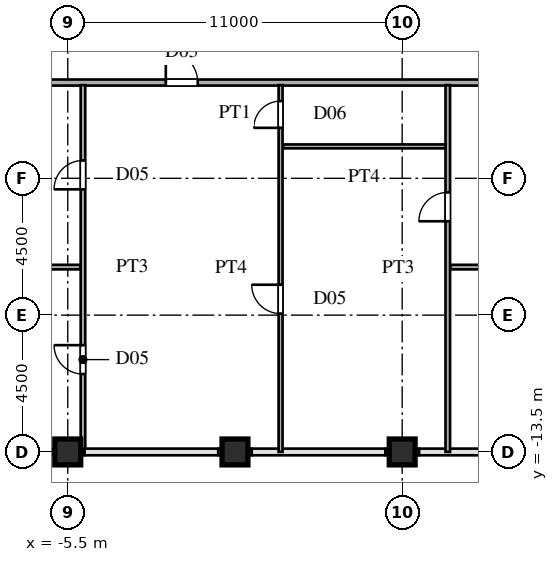
"""IFC4 building model, lengths in metres.
Left out: names, types, materials, properties, quantities, classifications, styles, units other than length and angle.
Written with IfcOpenShell. Run it as: python <this file> out.ifc"""

import sys

from ifc_helpers import new_model, si_unit, direction, frame, frame_2d, origin, origin_2d, place, context, subcontext, project, spatial, rectangle, hollow_rectangle, extrude, source, transform, mapped, element, fill, save


model = new_model("IFC4")
c1 = context("Model", 3, precision=1e-05, world=origin(), true_north=direction((0.0, 1.0)))
c2 = subcontext(c1, "Body", "Model", "MODEL_VIEW")
j1 = project(units=[si_unit("LENGTHUNIT", "METRE"), si_unit("PLANEANGLEUNIT", "RADIAN")], contexts=[c1])
p1 = place(None, origin())
s1 = spatial("IfcSite", under=j1, at=p1, CompositionType="ELEMENT")
p2 = place(p1, origin())
s2 = spatial("IfcBuilding", under=s1, at=p2, CompositionType="ELEMENT")
p3 = place(p2, frame((0.0, 0.0, 254.4)))
s3 = spatial("IfcBuildingStorey", under=s2, at=p3, CompositionType="ELEMENT", Elevation=254.4)
m1 = source(origin(), c2, "Body", "SweptSolid", [
    extrude(hollow_rectangle(XDim=0.85, YDim=0.85, WallThickness=0.036, at=origin_2d()), origin(), (0.0, 0.0, 1.0), 3.75),
])
for number, where, z_axis, x_axis in (
    (1, (-5.5, -13.5, 0.0), (0.0, 0.0, 1.0), (1.0, 0.0, 0.0)),
    (2, (0.0, -13.5, 0.0), (0.0, 0.0, 1.0), (1.0, 0.0, 0.0)),
    (3, (5.5, -13.5, 0.0), (0.0, 0.0, 1.0), (1.0, 0.0, 0.0)),
):
    element("IfcColumn", number, at=place(p3, frame(where, z_axis=z_axis, x_axis=x_axis)), inside=s3, PredefinedType="COLUMN", context=c2, shape_type="MappedRepresentation", body=[
        mapped(m1, transform((0.0, 0.0, 0.0), scale=1.0)),
    ])
for number, where, z_axis, x_axis in (
    (4, (-6.05, -13.5, 0.0), (0.0, 0.0, 1.0), (1.0, 0.0, 0.0)),
    (5, (-0.55, -13.5, 0.0), (0.0, 0.0, 1.0), (1.0, 0.0, 0.0)),
    (6, (4.95, -13.5, 0.0), (0.0, 0.0, 1.0), (1.0, 0.0, 0.0)),
):
    element("IfcWall", number, at=place(p3, frame(where, z_axis=z_axis, x_axis=x_axis)), inside=s3, PredefinedType="SOLIDWALL", context=c2, shape_type="SweptSolid", body=[
        extrude(rectangle(XDim=1.1, YDim=0.21, at=frame_2d((0.55, 0.0))), origin(), (0.0, 0.0, 1.0), 3.03),
    ])
p4 = place(p3, frame((-11.915, -7.42, 0.0), z_axis=(0.0, 0.0, 1.0), x_axis=(1.0, 0.0, 0.0)))
e7 = element("IfcWall", 7, at=p4, inside=s3, PredefinedType="PARTITIONING", context=c2, shape_type="SweptSolid", body=[
    extrude(rectangle(XDim=6.83, YDim=0.15, at=frame_2d((3.415, 0.0))), origin(), (0.0, 0.0, 1.0), 3.53),
])
p5 = place(p3, frame((7.085, -7.42, 0.0), z_axis=(0.0, 0.0, 1.0), x_axis=(1.0, 0.0, 0.0)))
e8 = element("IfcWall", 8, at=p5, inside=s3, PredefinedType="PARTITIONING", context=c2, shape_type="SweptSolid", body=[
    extrude(rectangle(XDim=20.16, YDim=0.15, at=frame_2d((10.08, 0.0))), origin(), (0.0, 0.0, 1.0), 3.53),
])
p6 = place(p5, frame((3.44, 0.0, 0.0)))
e9 = element("IfcOpeningElement", 9, at=p6, cuts=e8, PredefinedType="OPENING", context=c2, shape_type="SweptSolid", body=[
    extrude(rectangle(XDim=0.95, YDim=2.15, at=frame_2d((0.475, 1.075))), frame((0.0, 0.085, 0.0), z_axis=(0.0, -1.0, 0.0), x_axis=(1.0, 0.0, 0.0)), (0.0, 0.0, 1.0), 0.17),
])
p7 = place(p5, frame((10.69, 0.0, 0.0)))
e10 = element("IfcOpeningElement", 10, at=p7, cuts=e8, PredefinedType="OPENING", context=c2, shape_type="SweptSolid", body=[
    extrude(rectangle(XDim=0.95, YDim=2.15, at=frame_2d((0.475, 1.075))), frame((0.0, 0.085, 0.0), z_axis=(0.0, -1.0, 0.0), x_axis=(1.0, 0.0, 0.0)), (0.0, 0.0, 1.0), 0.17),
])
p8 = place(p5, frame((16.94, 0.0, 0.0)))
e11 = element("IfcOpeningElement", 11, at=p8, cuts=e8, PredefinedType="OPENING", context=c2, shape_type="SweptSolid", body=[
    extrude(rectangle(XDim=0.95, YDim=2.15, at=frame_2d((0.475, 1.075))), frame((0.0, 0.085, 0.0), z_axis=(0.0, -1.0, 0.0), x_axis=(1.0, 0.0, 0.0)), (0.0, 0.0, 1.0), 0.17),
])
p9 = place(p3, frame((1.585, -3.45, 0.0), z_axis=(0.0, 0.0, 1.0), x_axis=(1.0, 0.0, 0.0)))
e12 = element("IfcWall", 12, at=p9, inside=s3, PredefinedType="PARTITIONING", context=c2, shape_type="SweptSolid", body=[
    extrude(rectangle(XDim=5.33, YDim=0.13, at=frame_2d((2.665, 0.0))), origin(), (0.0, 0.0, 1.0), 3.53),
])
p10 = place(p3, frame((-27.245, -1.35, 0.0), z_axis=(0.0, 0.0, 1.0), x_axis=(1.0, 0.0, 0.0)))
e13 = element("IfcWall", 13, at=p10, inside=s3, PredefinedType="PARTITIONING", context=c2, shape_type="SweptSolid", body=[
    extrude(rectangle(XDim=54.49, YDim=0.2, at=frame_2d((27.245, 0.0))), origin(), (0.0, 0.0, 1.0), 3.53),
])
p11 = place(p10, frame((24.97, 0.0, 0.0)))
e14 = element("IfcOpeningElement", 14, at=p11, cuts=e13, PredefinedType="OPENING", context=c2, shape_type="SweptSolid", body=[
    extrude(rectangle(XDim=1.05, YDim=2.25, at=frame_2d((0.525, 1.125))), frame((0.0, 0.11, 0.0), z_axis=(0.0, -1.0, 0.0), x_axis=(1.0, 0.0, 0.0)), (0.0, 0.0, 1.0), 0.22),
])
p12 = place(p3, frame((-5.0, -13.39, 0.0), z_axis=(0.0, 0.0, 1.0), x_axis=(0.0, 1.0, 0.0)))
e15 = element("IfcWall", 15, at=p12, inside=s3, PredefinedType="PARTITIONING", context=c2, shape_type="SweptSolid", body=[
    extrude(rectangle(XDim=11.955, YDim=0.15, at=frame_2d((5.978, 0.0))), origin(), (0.0, 0.0, 1.0), 3.53),
])
p13 = place(p12, frame((8.528, 0.0, 0.0)))
e16 = element("IfcOpeningElement", 16, at=p13, cuts=e15, PredefinedType="OPENING", context=c2, shape_type="SweptSolid", body=[
    extrude(rectangle(XDim=0.95, YDim=2.15, at=frame_2d((0.475, 1.075))), frame((0.0, 0.085, 0.0), z_axis=(0.0, -1.0, 0.0), x_axis=(1.0, 0.0, 0.0)), (0.0, 0.0, 1.0), 0.17),
])
p14 = place(p12, frame((2.452, 0.0, 0.0)))
e17 = element("IfcOpeningElement", 17, at=p14, cuts=e15, PredefinedType="OPENING", context=c2, shape_type="SweptSolid", body=[
    extrude(rectangle(XDim=0.95, YDim=2.15, at=frame_2d((0.475, 1.075))), frame((0.0, 0.085, 0.0), z_axis=(0.0, -1.0, 0.0), x_axis=(1.0, 0.0, 0.0)), (0.0, 0.0, 1.0), 0.17),
])
p15 = place(p3, frame((1.5, -13.5, 0.0), z_axis=(0.0, 0.0, 1.0), x_axis=(0.0, 1.0, 0.0)))
e18 = element("IfcWall", 18, at=p15, inside=s3, PredefinedType="PARTITIONING", context=c2, shape_type="SweptSolid", body=[
    extrude(rectangle(XDim=12.065, YDim=0.13, at=frame_2d((6.032, 0.0))), origin(), (0.0, 0.0, 1.0), 3.53),
])
p16 = place(p15, frame((10.66, 0.0, 0.0)))
e19 = element("IfcOpeningElement", 19, at=p16, cuts=e18, PredefinedType="OPENING", context=c2, shape_type="SweptSolid", body=[
    extrude(rectangle(XDim=0.88, YDim=2.1, at=frame_2d((0.44, 1.05))), frame((0.0, 0.075, 0.0), z_axis=(0.0, -1.0, 0.0), x_axis=(1.0, 0.0, 0.0)), (0.0, 0.0, 1.0), 0.15),
])
p17 = place(p15, frame((4.55, 0.0, 0.0)))
e20 = element("IfcOpeningElement", 20, at=p17, cuts=e18, PredefinedType="OPENING", context=c2, shape_type="SweptSolid", body=[
    extrude(rectangle(XDim=0.95, YDim=2.15, at=frame_2d((0.475, 1.075))), frame((0.0, 0.075, 0.0), z_axis=(0.0, -1.0, 0.0), x_axis=(1.0, 0.0, 0.0)), (0.0, 0.0, 1.0), 0.15),
])
p18 = place(p3, frame((7.0, -13.5, 0.0), z_axis=(0.0, 0.0, 1.0), x_axis=(0.0, 1.0, 0.0)))
e21 = element("IfcWall", 21, at=p18, inside=s3, PredefinedType="PARTITIONING", context=c2, shape_type="SweptSolid", body=[
    extrude(rectangle(XDim=12.065, YDim=0.15, at=frame_2d((6.032, 0.0))), origin(), (0.0, 0.0, 1.0), 3.53),
])
p19 = place(p18, frame((7.587, 0.0, 0.0)))
e22 = element("IfcOpeningElement", 22, at=p19, cuts=e21, PredefinedType="OPENING", context=c2, shape_type="SweptSolid", body=[
    extrude(rectangle(XDim=0.95, YDim=2.15, at=frame_2d((0.475, 1.075))), frame((0.0, 0.085, 0.0), z_axis=(0.0, -1.0, 0.0), x_axis=(1.0, 0.0, 0.0)), (0.0, 0.0, 1.0), 0.17),
])
m2 = source(origin(), c2, "Body", "SweptSolid", [
    extrude(rectangle(XDim=1.05, YDim=2.25, at=frame_2d((0.525, 1.125))), frame((0.0, 0.025, 0.0), z_axis=(0.0, -1.0, 0.0), x_axis=(1.0, 0.0, 0.0)), (0.0, 0.0, 1.0), 0.05),
])
p20 = place(p11, origin())
e23 = element("IfcDoor", 23, at=p20, inside=s3, OperationType="SINGLE_SWING_LEFT", PredefinedType="DOOR", context=c2, shape_type="MappedRepresentation", body=[
    mapped(m2, transform((0.0, 0.0, 0.0), scale=1.0)),
])
fill(e14, e23)
m3 = source(origin(), c2, "Body", "SweptSolid", [
    extrude(rectangle(XDim=0.95, YDim=2.15, at=frame_2d((0.475, 1.075))), frame((0.0, 0.025, 0.0), z_axis=(0.0, -1.0, 0.0), x_axis=(1.0, 0.0, 0.0)), (0.0, 0.0, 1.0), 0.05),
])
p21 = place(p13, origin())
e24 = element("IfcDoor", 24, at=p21, inside=s3, OperationType="SINGLE_SWING_LEFT", PredefinedType="DOOR", context=c2, shape_type="MappedRepresentation", body=[
    mapped(m3, transform((0.0, 0.0, 0.0), scale=1.0)),
])
fill(e16, e24)
p22 = place(p14, origin())
e25 = element("IfcDoor", 25, at=p22, inside=s3, OperationType="SINGLE_SWING_RIGHT", PredefinedType="DOOR", context=c2, shape_type="MappedRepresentation", body=[
    mapped(m3, transform((0.0, 0.0, 0.0), scale=1.0)),
])
fill(e17, e25)
m4 = source(origin(), c2, "Body", "SweptSolid", [
    extrude(rectangle(XDim=0.88, YDim=2.1, at=frame_2d((0.44, 1.05))), frame((0.0, 0.025, 0.0), z_axis=(0.0, -1.0, 0.0), x_axis=(1.0, 0.0, 0.0)), (0.0, 0.0, 1.0), 0.05),
])
p23 = place(p16, origin())
e26 = element("IfcDoor", 26, at=p23, inside=s3, OperationType="SINGLE_SWING_LEFT", PredefinedType="DOOR", context=c2, shape_type="MappedRepresentation", body=[
    mapped(m4, transform((0.0, 0.0, 0.0), scale=1.0)),
])
fill(e19, e26)
p24 = place(p17, origin())
e27 = element("IfcDoor", 27, at=p24, inside=s3, OperationType="SINGLE_SWING_RIGHT", PredefinedType="DOOR", context=c2, shape_type="MappedRepresentation", body=[
    mapped(m3, transform((0.0, 0.0, 0.0), scale=1.0)),
])
fill(e20, e27)
p25 = place(p19, origin())
e28 = element("IfcDoor", 28, at=p25, inside=s3, OperationType="SINGLE_SWING_LEFT", PredefinedType="DOOR", context=c2, shape_type="MappedRepresentation", body=[
    mapped(m3, transform((0.0, 0.0, 0.0), scale=1.0)),
])
fill(e22, e28)
save(model, sys.argv[1])
